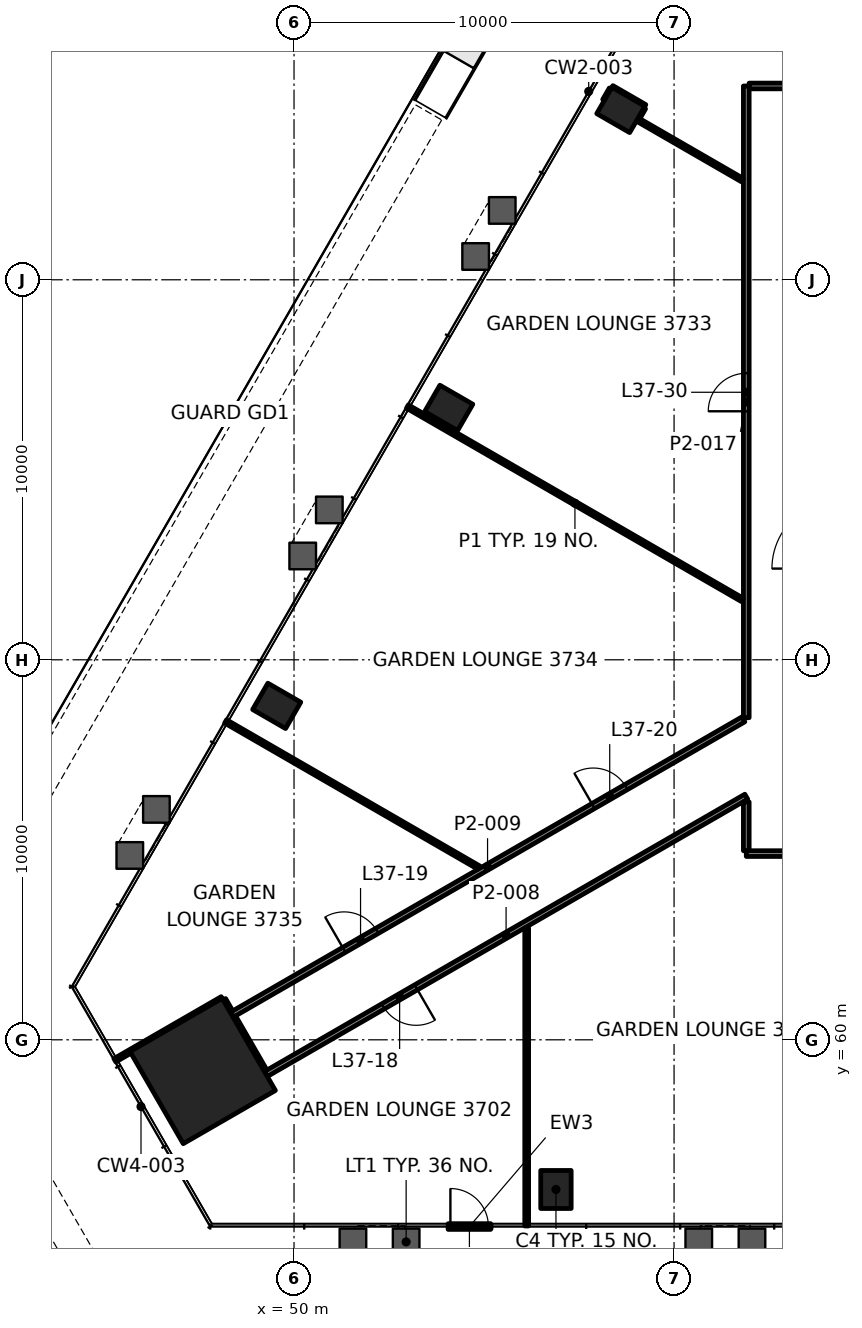
"""IFC4 building model, lengths in metres.
Left out: names, types, materials, properties, quantities, classifications, styles, units other than length and angle.
Written with IfcOpenShell. Run it as: python <this file> out.ifc"""

import sys

from ifc_helpers import new_model, si_unit, direction, frame, frame_2d, origin, origin_2d, place, context, subcontext, project, spatial, rectangle, hollow_rectangle, extrude, element, fill, save


model = new_model("IFC4")
c1 = context("Model", 3, precision=1e-05, world=origin(), true_north=direction((0.0, 1.0)))
c2 = subcontext(c1, "Body", "Model", "MODEL_VIEW")
j1 = project(units=[si_unit("LENGTHUNIT", "METRE"), si_unit("PLANEANGLEUNIT", "RADIAN")], contexts=[c1])
p1 = place(None, origin())
s1 = spatial("IfcSite", under=j1, at=p1, CompositionType="ELEMENT")
p2 = place(p1, origin())
s2 = spatial("IfcBuilding", under=s1, at=p2, CompositionType="ELEMENT")
p3 = place(p2, frame((0.0, 0.0, 163.6)))
s3 = spatial("IfcBuildingStorey", under=s2, at=p3, CompositionType="ELEMENT", Elevation=163.6)
p4 = place(p3, frame((47.597, 59.179, 0.0), z_axis=(0.0, 0.0, 1.0), x_axis=(0.5, -0.866025403784, 0.0)))
e1 = element("IfcColumn", 1, at=p4, inside=s3, PredefinedType="COLUMN", context=c2, shape_type="SweptSolid", body=[
    extrude(rectangle(XDim=2.8, YDim=2.8, at=origin_2d()), origin(), (0.0, 0.0, 1.0), 3.9),
])
for number, where, z_axis, x_axis in (
    (2, (56.892, 56.061, -0.0), (0.0, 0.0, 1.0), (1.0, 0.0, 0.0)),
    (3, (58.598, 84.469, -0.0), (0.0, 0.0, 1.0), (-0.5, -0.866, 0.0)),
    (4, (54.072, 76.628, -0.0), (0.0, 0.0, 1.0), (-0.5, -0.866, 0.0)),
    (5, (49.544, 68.788, -0.0), (0.0, 0.0, 1.0), (-0.5, -0.866, 0.0)),
):
    element("IfcColumn", number, at=place(p3, frame(where, z_axis=z_axis, x_axis=x_axis)), inside=s3, PredefinedType="COLUMN", context=c2, shape_type="SweptSolid", body=[
        extrude(hollow_rectangle(XDim=0.8, YDim=1.0, WallThickness=0.05, at=origin_2d()), origin(), (0.0, 0.0, 1.0), 3.9),
    ])
p5 = place(p3, frame((88.1, 64.9, 0.0), z_axis=(0.0, 0.0, 1.0), x_axis=(-1.0, 0.0, 0.0)))
e6 = element("IfcWall", 6, at=p5, inside=s3, PredefinedType="PARTITIONING", context=c2, shape_type="SweptSolid", body=[
    extrude(rectangle(XDim=26.199, YDim=0.15, at=frame_2d((13.1, 0.0))), origin(), (0.0, 0.0, 1.0), 3.1),
])
p6 = place(p5, frame((0.322, 0.0, 0.0)))
e7 = element("IfcOpeningElement", 7, at=p6, cuts=e6, PredefinedType="OPENING", context=c2, shape_type="SweptSolid", body=[
    extrude(rectangle(XDim=1.0, YDim=2.1, at=frame_2d((0.5, 1.05))), frame((0.0, 0.085, 0.0), z_axis=(0.0, -1.0, 0.0), x_axis=(1.0, 0.0, 0.0)), (0.0, 0.0, 1.0), 0.17),
])
p7 = place(p5, frame((5.859, 0.0, 0.0)))
e8 = element("IfcOpeningElement", 8, at=p7, cuts=e6, PredefinedType="OPENING", context=c2, shape_type="SweptSolid", body=[
    extrude(rectangle(XDim=0.9, YDim=2.1, at=frame_2d((0.45, 1.05))), frame((0.0, 0.085, 0.0), z_axis=(0.0, -1.0, 0.0), x_axis=(1.0, 0.0, 0.0)), (0.0, 0.0, 1.0), 0.17),
])
p8 = place(p5, frame((8.981, 0.0, 0.0)))
e9 = element("IfcOpeningElement", 9, at=p8, cuts=e6, PredefinedType="OPENING", context=c2, shape_type="SweptSolid", body=[
    extrude(rectangle(XDim=1.0, YDim=2.1, at=frame_2d((0.5, 1.05))), frame((0.0, 0.085, 0.0), z_axis=(0.0, -1.0, 0.0), x_axis=(1.0, 0.0, 0.0)), (0.0, 0.0, 1.0), 0.17),
])
p9 = place(p5, frame((16.611, 0.0, 0.0)))
e10 = element("IfcOpeningElement", 10, at=p9, cuts=e6, PredefinedType="OPENING", context=c2, shape_type="SweptSolid", body=[
    extrude(rectangle(XDim=0.9, YDim=2.1, at=frame_2d((0.45, 1.05))), frame((0.0, 0.085, 0.0), z_axis=(0.0, -1.0, 0.0), x_axis=(1.0, 0.0, 0.0)), (0.0, 0.0, 1.0), 0.17),
])
p10 = place(p5, frame((20.006, 0.0, 0.0)))
e11 = element("IfcOpeningElement", 11, at=p10, cuts=e6, PredefinedType="OPENING", context=c2, shape_type="SweptSolid", body=[
    extrude(rectangle(XDim=0.9, YDim=2.1, at=frame_2d((0.45, 1.05))), frame((0.0, 0.085, 0.0), z_axis=(0.0, -1.0, 0.0), x_axis=(1.0, 0.0, 0.0)), (0.0, 0.0, 1.0), 0.17),
])
p11 = place(p5, frame((23.575, 0.0, 0.0)))
e12 = element("IfcOpeningElement", 12, at=p11, cuts=e6, PredefinedType="OPENING", context=c2, shape_type="SweptSolid", body=[
    extrude(rectangle(XDim=1.0, YDim=2.1, at=frame_2d((0.5, 1.05))), frame((0.0, 0.085, 0.0), z_axis=(0.0, -1.0, 0.0), x_axis=(1.0, 0.0, 0.0)), (0.0, 0.0, 1.0), 0.17),
])
p12 = place(p3, frame((61.976, 85.1, 0.0), z_axis=(0.0, 0.0, 1.0), x_axis=(1.0, 0.0, 0.0)))
e13 = element("IfcWall", 13, at=p12, inside=s3, PredefinedType="PARTITIONING", context=c2, shape_type="SweptSolid", body=[
    extrude(rectangle(XDim=7.958, YDim=0.15, at=frame_2d((3.979, 0.0))), origin(), (0.0, 0.0, 1.0), 3.1),
])
p13 = place(p12, frame((3.479, 0.0, 0.0)))
e14 = element("IfcOpeningElement", 14, at=p13, cuts=e13, PredefinedType="OPENING", context=c2, shape_type="SweptSolid", body=[
    extrude(rectangle(XDim=1.0, YDim=2.1, at=frame_2d((0.5, 1.05))), frame((0.0, 0.085, 0.0), z_axis=(0.0, -1.0, 0.0), x_axis=(1.0, 0.0, 0.0)), (0.0, 0.0, 1.0), 0.17),
])
p14 = place(p3, frame((61.9, 66.397, 0.0), z_axis=(0.0, 0.0, 1.0), x_axis=(-0.86603071172, -0.499990806274, 0.0)))
e15 = element("IfcWall", 15, at=p14, inside=s3, PredefinedType="PARTITIONING", context=c2, shape_type="SweptSolid", body=[
    extrude(rectangle(XDim=14.595, YDim=0.15, at=frame_2d((7.298, 0.0))), origin(), (0.0, 0.0, 1.0), 2.947),
])
p15 = place(p14, frame((10.032, 0.0, 0.0)))
e16 = element("IfcOpeningElement", 16, at=p15, cuts=e15, PredefinedType="OPENING", context=c2, shape_type="SweptSolid", body=[
    extrude(rectangle(XDim=1.0, YDim=2.1, at=frame_2d((0.5, 1.05))), frame((0.0, 0.085, 0.0), z_axis=(0.0, -1.0, 0.0), x_axis=(1.0, 0.0, 0.0)), (0.0, 0.0, 1.0), 0.17),
])
p16 = place(p3, frame((48.36, 60.659, 0.0), z_axis=(0.0, 0.0, 1.0), x_axis=(0.866033404619, 0.499986141892, 0.0)))
e17 = element("IfcWall", 17, at=p16, inside=s3, PredefinedType="PARTITIONING", context=c2, shape_type="SweptSolid", body=[
    extrude(rectangle(XDim=15.548, YDim=0.15, at=frame_2d((7.774, 0.0))), origin(), (0.0, 0.0, 1.0), 3.1),
])
p17 = place(p16, frame((3.415, 0.0, 0.0)))
e18 = element("IfcOpeningElement", 18, at=p17, cuts=e17, PredefinedType="OPENING", context=c2, shape_type="SweptSolid", body=[
    extrude(rectangle(XDim=1.0, YDim=2.1, at=frame_2d((0.5, 1.05))), frame((0.0, 0.085, 0.0), z_axis=(0.0, -1.0, 0.0), x_axis=(1.0, 0.0, 0.0)), (0.0, 0.0, 1.0), 0.17),
])
p18 = place(p16, frame((10.986, 0.0, 0.0)))
e19 = element("IfcOpeningElement", 19, at=p18, cuts=e17, PredefinedType="OPENING", context=c2, shape_type="SweptSolid", body=[
    extrude(rectangle(XDim=1.0, YDim=2.1, at=frame_2d((0.5, 1.05))), frame((0.0, 0.085, 0.0), z_axis=(0.0, -1.0, 0.0), x_axis=(1.0, 0.0, 0.0)), (0.0, 0.0, 1.0), 0.17),
])
p19 = place(p3, frame((45.286, 59.461, 0.0), z_axis=(0.0, 0.0, 1.0), x_axis=(0.866035906198, 0.499981808845, 0.0)))
e20 = element("IfcWall", 20, at=p19, inside=s3, PredefinedType="PARTITIONING", context=c2, shape_type="SweptSolid", body=[
    extrude(rectangle(XDim=3.259, YDim=0.1, at=frame_2d((1.63, 0.0))), origin(), (0.0, 0.0, 1.0), 3.1),
])
p20 = place(p3, frame((59.057, 84.263, 0.0), z_axis=(0.0, 0.0, 1.0), x_axis=(0.500264001326, 0.865872928886, 0.0)))
e21 = element("IfcWall", 21, at=p20, inside=s3, PredefinedType="PARTITIONING", context=c2, shape_type="SweptSolid", body=[
    extrude(rectangle(XDim=0.299, YDim=0.1, at=frame_2d((0.149, 0.0))), origin(), (0.0, 0.0, 1.0), 3.1),
])
p21 = place(p3, frame((58.166, 84.72, 0.0), z_axis=(0.0, 0.0, 1.0), x_axis=(0.499601298118, 0.866255472086, 0.0)))
e22 = element("IfcWall", 22, at=p21, inside=s3, PredefinedType="PARTITIONING", context=c2, shape_type="SweptSolid", body=[
    extrude(rectangle(XDim=0.349, YDim=0.1, at=frame_2d((0.174, 0.0))), origin(), (0.0, 0.0, 1.0), 3.1),
])
p22 = place(p3, frame((61.9, 64.976, 0.0), z_axis=(0.0, 0.0, 1.0), x_axis=(0.0, 1.0, 0.0)))
e23 = element("IfcWall", 23, at=p22, inside=s3, PredefinedType="PARTITIONING", context=c2, shape_type="SweptSolid", body=[
    extrude(rectangle(XDim=1.285, YDim=0.15, at=frame_2d((0.643, 0.0))), origin(), (0.0, 0.0, 1.0), 2.947),
])
p23 = place(p3, frame((61.9, 68.476, 0.0), z_axis=(0.0, 0.0, 1.0), x_axis=(0.0, 1.0, 0.0)))
e24 = element("IfcWall", 24, at=p23, inside=s3, PredefinedType="PARTITIONING", context=c2, shape_type="SweptSolid", body=[
    extrude(rectangle(XDim=16.624, YDim=0.15, at=frame_2d((8.312, 0.0))), origin(), (0.0, 0.0, 1.0), 3.1),
])
p24 = place(p23, frame((8.064, 0.0, 0.0)))
e25 = element("IfcOpeningElement", 25, at=p24, cuts=e24, PredefinedType="OPENING", context=c2, shape_type="SweptSolid", body=[
    extrude(rectangle(XDim=1.0, YDim=2.1, at=frame_2d((0.5, 1.05))), frame((0.0, 0.085, 0.0), z_axis=(0.0, -1.0, 0.0), x_axis=(1.0, 0.0, 0.0)), (0.0, 0.0, 1.0), 0.17),
])
p25 = place(p3, frame((56.122, 55.101, 0.0), z_axis=(0.0, 0.0, 1.0), x_axis=(0.0, 1.0, 0.0)))
e26 = element("IfcWall", 26, at=p25, inside=s3, PredefinedType="PARTITIONING", context=c2, shape_type="SweptSolid", body=[
    extrude(rectangle(XDim=7.844, YDim=0.1, at=frame_2d((3.922, 0.0))), origin(), (0.0, 0.0, 1.0), 3.1),
])
p26 = place(p3, frame((49.222, 59.165, 0.0), z_axis=(0.0, 0.0, 1.0), x_axis=(-0.499991515992, 0.866030301974, 0.0)))
e27 = element("IfcWall", 27, at=p26, inside=s3, PredefinedType="PARTITIONING", context=c2, shape_type="SweptSolid", body=[
    extrude(rectangle(XDim=1.649, YDim=0.15, at=frame_2d((0.825, 0.0))), origin(), (0.0, 0.0, 1.0), 2.947),
])
p27 = place(p3, frame((59.231, 84.566, 0.0), z_axis=(0.0, 0.0, 1.0), x_axis=(-0.866039090965, 0.499976292358, 0.0)))
e28 = element("IfcWall", 28, at=p27, inside=s3, PredefinedType="PARTITIONING", context=c2, shape_type="SweptSolid", body=[
    extrude(rectangle(XDim=0.999, YDim=0.1, at=frame_2d((0.5, 0.0))), origin(), (0.0, 0.0, 1.0), 2.865),
])
p28 = place(p3, frame((61.799, 82.622, 0.0), z_axis=(0.0, 0.0, 1.0), x_axis=(-0.866015079179, 0.500017882314, 0.0)))
e29 = element("IfcWall", 29, at=p28, inside=s3, PredefinedType="PARTITIONING", context=c2, shape_type="SweptSolid", body=[
    extrude(rectangle(XDim=3.195, YDim=0.1, at=frame_2d((1.598, 0.0))), origin(), (0.0, 0.0, 1.0), 3.1),
])
p29 = place(p3, frame((61.799, 71.574, 0.0), z_axis=(0.0, 0.0, 1.0), x_axis=(-0.866020635606, 0.500008258637, 0.0)))
e30 = element("IfcWall", 30, at=p29, inside=s3, PredefinedType="PARTITIONING", context=c2, shape_type="SweptSolid", body=[
    extrude(rectangle(XDim=10.179, YDim=0.1, at=frame_2d((5.09, 0.0))), origin(), (0.0, 0.0, 1.0), 2.865),
])
p30 = place(p3, frame((54.864, 64.53, 0.0), z_axis=(0.0, 0.0, 1.0), x_axis=(-0.86601864019, 0.500011714706, 0.0)))
e31 = element("IfcWall", 31, at=p30, inside=s3, PredefinedType="PARTITIONING", context=c2, shape_type="SweptSolid", body=[
    extrude(rectangle(XDim=7.696, YDim=0.1, at=frame_2d((3.848, 0.0))), origin(), (0.0, 0.0, 1.0), 3.1),
])
p31 = place(p3, frame((48.322, 60.723, 0.0), z_axis=(0.0, 0.0, 1.0), x_axis=(-0.499854089722, 0.866109628736, 0.0)))
e32 = element("IfcWall", 32, at=p31, inside=s3, PredefinedType="PARTITIONING", context=c2, shape_type="SweptSolid", body=[
    extrude(rectangle(XDim=0.375, YDim=0.15, at=frame_2d((0.187, 0.0))), origin(), (0.0, 0.0, 1.0), 3.1),
])
p32 = place(p3, frame((53.539, 84.406, 0.0), z_axis=(0.0, 0.0, 1.0), x_axis=(-0.499993800457, -0.866028983062, 0.0)))
e33 = element("IfcWall", 33, at=p32, inside=s3, PredefinedType="SOLIDWALL", context=c2, shape_type="SweptSolid", body=[
    extrude(rectangle(XDim=25.987, YDim=0.8, at=frame_2d((12.994, 0.0))), origin(), (0.0, 0.0, 1.0), 0.9),
])
p33 = place(p3, frame((40.546, 60.892, 0.0), z_axis=(0.0, 0.0, 1.0), x_axis=(0.49999175339, -0.866030164915, 0.0)))
e34 = element("IfcWall", 34, at=p33, inside=s3, PredefinedType="SOLIDWALL", context=c2, shape_type="SweptSolid", body=[
    extrude(rectangle(XDim=10.019, YDim=0.8, at=frame_2d((5.009, 0.0))), origin(), (0.0, 0.0, 1.0), 0.9),
])
p34 = place(p15, origin())
e35 = element("IfcDoor", 35, at=p34, inside=s3, OperationType="SINGLE_SWING_RIGHT", PredefinedType="DOOR", context=c2, shape_type="SweptSolid", body=[
    extrude(rectangle(XDim=1.0, YDim=2.1, at=frame_2d((0.5, 1.05))), frame((0.0, 0.025, 0.0), z_axis=(0.0, -1.0, 0.0), x_axis=(1.0, 0.0, 0.0)), (0.0, 0.0, 1.0), 0.05),
])
fill(e16, e35)
p35 = place(p17, origin())
e36 = element("IfcDoor", 36, at=p35, inside=s3, OperationType="SINGLE_SWING_RIGHT", PredefinedType="DOOR", context=c2, shape_type="SweptSolid", body=[
    extrude(rectangle(XDim=1.0, YDim=2.1, at=frame_2d((0.5, 1.05))), frame((0.0, 0.025, 0.0), z_axis=(0.0, -1.0, 0.0), x_axis=(1.0, 0.0, 0.0)), (0.0, 0.0, 1.0), 0.05),
])
fill(e18, e36)
p36 = place(p18, origin())
e37 = element("IfcDoor", 37, at=p36, inside=s3, OperationType="SINGLE_SWING_LEFT", PredefinedType="DOOR", context=c2, shape_type="SweptSolid", body=[
    extrude(rectangle(XDim=1.0, YDim=2.1, at=frame_2d((0.5, 1.05))), frame((0.0, 0.025, 0.0), z_axis=(0.0, -1.0, 0.0), x_axis=(1.0, 0.0, 0.0)), (0.0, 0.0, 1.0), 0.05),
])
fill(e19, e37)
p37 = place(p24, origin())
e38 = element("IfcDoor", 38, at=p37, inside=s3, OperationType="SINGLE_SWING_RIGHT", PredefinedType="DOOR", context=c2, shape_type="SweptSolid", body=[
    extrude(rectangle(XDim=1.0, YDim=2.1, at=frame_2d((0.5, 1.05))), frame((0.0, 0.025, 0.0), z_axis=(0.0, -1.0, 0.0), x_axis=(1.0, 0.0, 0.0)), (0.0, 0.0, 1.0), 0.05),
])
fill(e25, e38)
p38 = place(p3, frame((54.055, 55.086, 0.0), z_axis=(0.0, 0.0, 1.0), x_axis=(1.0, 0.0, 0.0)))
p39 = place(p38, frame((0.06, 0.0, 0.0)))
p40 = place(p39, origin())
e39 = element("IfcDoor", 39, at=p40, inside=s3, OperationType="SINGLE_SWING_RIGHT", PredefinedType="DOOR", context=c2, shape_type="SweptSolid", body=[
    extrude(rectangle(XDim=1.0, YDim=2.1, at=frame_2d((0.5, 1.05))), frame((0.0, 0.025, 0.0), z_axis=(0.0, -1.0, 0.0), x_axis=(1.0, 0.0, 0.0)), (0.0, 0.0, 1.0), 0.05),
])
save(model, sys.argv[1])
